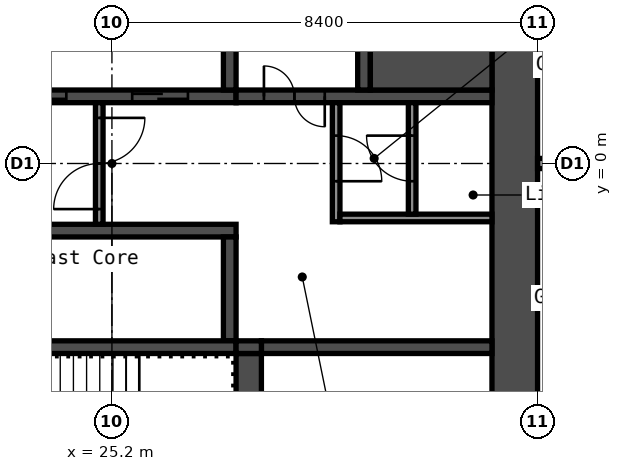
"""IFC4 building model, lengths in metres.
Left out: names, types, materials, properties, quantities, classifications, styles, units other than length and angle.
Written with IfcOpenShell. Run it as: python <this file> out.ifc"""

import sys

from ifc_helpers import new_model, si_unit, direction, frame, frame_2d, origin, place, context, subcontext, project, spatial, rectangle, extrude, element, fill, save


model = new_model("IFC4")
c1 = context("Model", 3, precision=1e-05, world=origin(), true_north=direction((0.0, 1.0)))
c2 = subcontext(c1, "Body", "Model", "MODEL_VIEW")
j1 = project(units=[si_unit("LENGTHUNIT", "METRE"), si_unit("PLANEANGLEUNIT", "RADIAN")], contexts=[c1])
p1 = place(None, origin())
s1 = spatial("IfcSite", under=j1, at=p1, CompositionType="ELEMENT")
p2 = place(p1, origin())
s2 = spatial("IfcBuilding", under=s1, at=p2, CompositionType="ELEMENT")
p3 = place(p2, frame((0.0, 0.0, 32.6)))
s3 = spatial("IfcBuildingStorey", under=s2, at=p3, CompositionType="ELEMENT", Elevation=32.6)
p4 = place(p3, frame((33.15, -8.4, 0.0), z_axis=(0.0, 0.0, 1.0), x_axis=(0.0, 1.0, 0.0)))
e1 = element("IfcWall", 1, at=p4, inside=s3, PredefinedType="SHEAR", context=c2, shape_type="SweptSolid", body=[
    extrude(rectangle(XDim=16.8, YDim=0.9, at=frame_2d((8.4, 0.0))), origin(), (0.0, 0.0, 1.0), 2.8),
])
p5 = place(p3, frame((20.15, 1.325, 0.0), z_axis=(0.0, 0.0, 1.0), x_axis=(1.0, 0.0, 0.0)))
e2 = element("IfcWall", 2, at=p5, inside=s3, PredefinedType="SHEAR", context=c2, shape_type="SweptSolid", body=[
    extrude(rectangle(XDim=7.5, YDim=0.25, at=frame_2d((3.75, 0.0))), origin(), (0.0, 0.0, 1.0), 2.8),
])
p6 = place(p5, frame((0.65, 0.0, 0.0)))
e3 = element("IfcOpeningElement", 3, at=p6, cuts=e2, PredefinedType="OPENING", context=c2, shape_type="SweptSolid", body=[
    extrude(rectangle(XDim=1.1, YDim=2.1, at=frame_2d((0.55, 1.05))), frame((0.0, 0.135, 0.0), z_axis=(0.0, -1.0, 0.0), x_axis=(1.0, 0.0, 0.0)), (0.0, 0.0, 1.0), 0.27),
])
p7 = place(p5, frame((3.05, 0.0, 0.0)))
e4 = element("IfcOpeningElement", 4, at=p7, cuts=e2, PredefinedType="OPENING", context=c2, shape_type="SweptSolid", body=[
    extrude(rectangle(XDim=1.1, YDim=2.1, at=frame_2d((0.55, 1.05))), frame((0.0, 0.135, 0.0), z_axis=(0.0, -1.0, 0.0), x_axis=(1.0, 0.0, 0.0)), (0.0, 0.0, 1.0), 0.27),
])
p8 = place(p5, frame((5.45, 0.0, 0.0)))
e5 = element("IfcOpeningElement", 5, at=p8, cuts=e2, PredefinedType="OPENING", context=c2, shape_type="SweptSolid", body=[
    extrude(rectangle(XDim=1.1, YDim=2.1, at=frame_2d((0.55, 1.05))), frame((0.0, 0.135, 0.0), z_axis=(0.0, -1.0, 0.0), x_axis=(1.0, 0.0, 0.0)), (0.0, 0.0, 1.0), 0.27),
])
p9 = place(p3, frame((27.525, 1.45, 0.0), z_axis=(0.0, 0.0, 1.0), x_axis=(0.0, 1.0, 0.0)))
e6 = element("IfcWall", 6, at=p9, inside=s3, PredefinedType="SHEAR", context=c2, shape_type="SweptSolid", body=[
    extrude(rectangle(XDim=2.05, YDim=0.25, at=frame_2d((1.025, 0.0))), origin(), (0.0, 0.0, 1.0), 2.8),
])
p10 = place(p3, frame((27.65, 1.325, 0.0), z_axis=(0.0, 0.0, 1.0), x_axis=(1.0, 0.0, 0.0)))
e7 = element("IfcWall", 7, at=p10, inside=s3, PredefinedType="SHEAR", context=c2, shape_type="SweptSolid", body=[
    extrude(rectangle(XDim=5.05, YDim=0.25, at=frame_2d((2.525, 0.0))), origin(), (0.0, 0.0, 1.0), 2.8),
])
p11 = place(p10, frame((0.55, 0.0, 0.0)))
e8 = element("IfcOpeningElement", 8, at=p11, cuts=e7, PredefinedType="OPENING", context=c2, shape_type="SweptSolid", body=[
    extrude(rectangle(XDim=1.2, YDim=2.1, at=frame_2d((0.6, 1.05))), frame((0.0, 0.135, 0.0), z_axis=(0.0, -1.0, 0.0), x_axis=(1.0, 0.0, 0.0)), (0.0, 0.0, 1.0), 0.27),
])
p12 = place(p3, frame((30.175, 1.45, 0.0), z_axis=(0.0, 0.0, 1.0), x_axis=(0.0, 1.0, 0.0)))
e9 = element("IfcWall", 9, at=p12, inside=s3, PredefinedType="SHEAR", context=c2, shape_type="SweptSolid", body=[
    extrude(rectangle(XDim=6.05, YDim=0.25, at=frame_2d((3.025, 0.0))), origin(), (0.0, 0.0, 1.0), 2.8),
])
p13 = place(p12, frame((2.625, 0.0, 0.0)))
e10 = element("IfcOpeningElement", 10, at=p13, cuts=e9, PredefinedType="OPENING", context=c2, shape_type="SweptSolid", body=[
    extrude(rectangle(XDim=1.1, YDim=2.1, at=frame_2d((0.55, 1.05))), frame((0.0, 0.135, 0.0), z_axis=(0.0, -1.0, 0.0), x_axis=(1.0, 0.0, 0.0)), (0.0, 0.0, 1.0), 0.27),
])
p14 = place(p3, frame((30.3, 2.375, 0.0), z_axis=(0.0, 0.0, 1.0), x_axis=(1.0, 0.0, 0.0)))
e11 = element("IfcWall", 11, at=p14, inside=s3, PredefinedType="SHEAR", context=c2, shape_type="SweptSolid", body=[
    extrude(rectangle(XDim=2.4, YDim=1.85, at=frame_2d((1.2, 0.0))), origin(), (0.0, 0.0, 1.0), 2.8),
])
p15 = place(p3, frame((20.15, -1.325, 0.0), z_axis=(0.0, 0.0, 1.0), x_axis=(1.0, 0.0, 0.0)))
e12 = element("IfcWall", 12, at=p15, inside=s3, PredefinedType="SHEAR", context=c2, shape_type="SweptSolid", body=[
    extrude(rectangle(XDim=7.5, YDim=0.25, at=frame_2d((3.75, 0.0))), origin(), (0.0, 0.0, 1.0), 2.8),
])
p16 = place(p3, frame((27.525, -3.5, 0.0), z_axis=(0.0, 0.0, 1.0), x_axis=(0.0, 1.0, 0.0)))
e13 = element("IfcWall", 13, at=p16, inside=s3, PredefinedType="SHEAR", context=c2, shape_type="SweptSolid", body=[
    extrude(rectangle(XDim=2.05, YDim=0.25, at=frame_2d((1.025, 0.0))), origin(), (0.0, 0.0, 1.0), 2.8),
])
p17 = place(p3, frame((20.15, -3.625, 0.0), z_axis=(0.0, 0.0, 1.0), x_axis=(1.0, 0.0, 0.0)))
e14 = element("IfcWall", 14, at=p17, inside=s3, PredefinedType="SHEAR", context=c2, shape_type="SweptSolid", body=[
    extrude(rectangle(XDim=7.5, YDim=0.25, at=frame_2d((3.75, 0.0))), origin(), (0.0, 0.0, 1.0), 2.8),
])
p18 = place(p3, frame((27.9, -7.5, 0.0), z_axis=(0.0, 0.0, 1.0), x_axis=(0.0, 1.0, 0.0)))
e15 = element("IfcWall", 15, at=p18, inside=s3, PredefinedType="SHEAR", context=c2, shape_type="SweptSolid", body=[
    extrude(rectangle(XDim=3.75, YDim=0.5, at=frame_2d((1.875, 0.0))), origin(), (0.0, 0.0, 1.0), 2.8),
])
p19 = place(p3, frame((28.15, -3.625, 0.0), z_axis=(0.0, 0.0, 1.0), x_axis=(1.0, 0.0, 0.0)))
e16 = element("IfcWall", 16, at=p19, inside=s3, PredefinedType="SHEAR", context=c2, shape_type="SweptSolid", body=[
    extrude(rectangle(XDim=4.55, YDim=0.25, at=frame_2d((2.275, 0.0))), origin(), (0.0, 0.0, 1.0), 2.8),
])
p20 = place(p3, frame((27.65, -3.625, 0.0), z_axis=(0.0, 0.0, 1.0), x_axis=(1.0, 0.0, 0.0)))
e17 = element("IfcWall", 17, at=p20, inside=s3, PredefinedType="SHEAR", context=c2, shape_type="SweptSolid", body=[
    extrude(rectangle(XDim=0.5, YDim=0.25, at=frame_2d((0.25, 0.0))), origin(), (0.0, 0.0, 1.0), 2.8),
])
p21 = place(p3, frame((24.95, -1.2, 0.0), z_axis=(0.0, 0.0, 1.0), x_axis=(0.0, 1.0, 0.0)))
e18 = element("IfcWall", 18, at=p21, inside=s3, PredefinedType="PARTITIONING", context=c2, shape_type="SweptSolid", body=[
    extrude(rectangle(XDim=2.4, YDim=0.15, at=frame_2d((1.2, 0.0))), origin(), (0.0, 0.0, 1.0), 2.8),
])
p22 = place(p21, frame((0.3, 0.0, 0.0)))
e19 = element("IfcOpeningElement", 19, at=p22, cuts=e18, PredefinedType="OPENING", context=c2, shape_type="SweptSolid", body=[
    extrude(rectangle(XDim=1.8, YDim=2.1, at=frame_2d((0.9, 1.05))), frame((0.0, 0.085, 0.0), z_axis=(0.0, -1.0, 0.0), x_axis=(1.0, 0.0, 0.0)), (0.0, 0.0, 1.0), 0.17),
])
p23 = place(p3, frame((29.625, -1.15, 0.0), z_axis=(0.0, 0.0, 1.0), x_axis=(0.0, 1.0, 0.0)))
e20 = element("IfcWall", 20, at=p23, inside=s3, PredefinedType="PARTITIONING", context=c2, shape_type="SweptSolid", body=[
    extrude(rectangle(XDim=2.35, YDim=0.15, at=frame_2d((1.175, 0.0))), origin(), (0.0, 0.0, 1.0), 2.8),
])
p24 = place(p23, frame((0.8, 0.0, 0.0)))
e21 = element("IfcOpeningElement", 21, at=p24, cuts=e20, PredefinedType="OPENING", context=c2, shape_type="SweptSolid", body=[
    extrude(rectangle(XDim=0.9, YDim=2.1, at=frame_2d((0.45, 1.05))), frame((0.0, 0.085, 0.0), z_axis=(0.0, -1.0, 0.0), x_axis=(1.0, 0.0, 0.0)), (0.0, 0.0, 1.0), 0.17),
])
p25 = place(p3, frame((29.7, -1.075, 0.0), z_axis=(0.0, 0.0, 1.0), x_axis=(1.0, 0.0, 0.0)))
e22 = element("IfcWall", 22, at=p25, inside=s3, PredefinedType="PARTITIONING", context=c2, shape_type="SweptSolid", body=[
    extrude(rectangle(XDim=3.0, YDim=0.15, at=frame_2d((1.5, 0.0))), origin(), (0.0, 0.0, 1.0), 2.8),
])
p26 = place(p3, frame((31.125, -1.0, 0.0), z_axis=(0.0, 0.0, 1.0), x_axis=(0.0, 1.0, 0.0)))
e23 = element("IfcWall", 23, at=p26, inside=s3, PredefinedType="PARTITIONING", context=c2, shape_type="SweptSolid", body=[
    extrude(rectangle(XDim=2.2, YDim=0.15, at=frame_2d((1.1, 0.0))), origin(), (0.0, 0.0, 1.0), 2.8),
])
p27 = place(p26, frame((0.65, 0.0, 0.0)))
e24 = element("IfcOpeningElement", 24, at=p27, cuts=e23, PredefinedType="OPENING", context=c2, shape_type="SweptSolid", body=[
    extrude(rectangle(XDim=0.9, YDim=2.1, at=frame_2d((0.45, 1.05))), frame((0.0, 0.085, 0.0), z_axis=(0.0, -1.0, 0.0), x_axis=(1.0, 0.0, 0.0)), (0.0, 0.0, 1.0), 0.17),
])
p28 = place(p3, frame((33.6, 0.0, 0.0), z_axis=(0.0, 0.0, 1.0), x_axis=(1.0, 0.0, 0.0)))
e25 = element("IfcWall", 25, at=p28, inside=s3, PredefinedType="PARTITIONING", context=c2, shape_type="SweptSolid", body=[
    extrude(rectangle(XDim=14.9, YDim=0.2, at=frame_2d((7.45, 0.0))), origin(), (0.0, 0.0, 1.0), 2.8),
])
p29 = place(p11, origin())
e26 = element("IfcDoor", 26, at=p29, inside=s3, OperationType="DOUBLE_DOOR_SINGLE_SWING", PredefinedType="DOOR", context=c2, shape_type="SweptSolid", body=[
    extrude(rectangle(XDim=1.2, YDim=2.1, at=frame_2d((0.6, 1.05))), frame((0.0, 0.025, 0.0), z_axis=(0.0, -1.0, 0.0), x_axis=(1.0, 0.0, 0.0)), (0.0, 0.0, 1.0), 0.05),
])
fill(e8, e26)
p30 = place(p22, origin())
e27 = element("IfcDoor", 27, at=p30, inside=s3, OperationType="DOUBLE_DOOR_SINGLE_SWING", PredefinedType="DOOR", context=c2, shape_type="SweptSolid", body=[
    extrude(rectangle(XDim=1.8, YDim=2.1, at=frame_2d((0.9, 1.05))), frame((0.0, 0.025, 0.0), z_axis=(0.0, -1.0, 0.0), x_axis=(1.0, 0.0, 0.0)), (0.0, 0.0, 1.0), 0.05),
])
fill(e19, e27)
p31 = place(p24, origin())
e28 = element("IfcDoor", 28, at=p31, inside=s3, OperationType="SINGLE_SWING_LEFT", PredefinedType="DOOR", context=c2, shape_type="SweptSolid", body=[
    extrude(rectangle(XDim=0.9, YDim=2.1, at=frame_2d((0.45, 1.05))), frame((0.0, 0.025, 0.0), z_axis=(0.0, -1.0, 0.0), x_axis=(1.0, 0.0, 0.0)), (0.0, 0.0, 1.0), 0.05),
])
fill(e21, e28)
p32 = place(p27, origin())
e29 = element("IfcDoor", 29, at=p32, inside=s3, OperationType="SINGLE_SWING_LEFT", PredefinedType="DOOR", context=c2, shape_type="SweptSolid", body=[
    extrude(rectangle(XDim=0.9, YDim=2.1, at=frame_2d((0.45, 1.05))), frame((0.0, 0.025, 0.0), z_axis=(0.0, -1.0, 0.0), x_axis=(1.0, 0.0, 0.0)), (0.0, 0.0, 1.0), 0.05),
])
fill(e24, e29)
p33 = place(p7, origin())
e30 = element("IfcDoor", 30, at=p33, inside=s3, OperationType="DOUBLE_DOOR_SLIDING", PredefinedType="DOOR", context=c2, shape_type="SweptSolid", body=[
    extrude(rectangle(XDim=1.1, YDim=2.1, at=frame_2d((0.55, 1.05))), frame((0.0, 0.025, 0.0), z_axis=(0.0, -1.0, 0.0), x_axis=(1.0, 0.0, 0.0)), (0.0, 0.0, 1.0), 0.05),
])
fill(e4, e30)
p34 = place(p8, origin())
e31 = element("IfcDoor", 31, at=p34, inside=s3, OperationType="DOUBLE_DOOR_SLIDING", PredefinedType="DOOR", context=c2, shape_type="SweptSolid", body=[
    extrude(rectangle(XDim=1.1, YDim=2.1, at=frame_2d((0.55, 1.05))), frame((0.0, 0.025, 0.0), z_axis=(0.0, -1.0, 0.0), x_axis=(1.0, 0.0, 0.0)), (0.0, 0.0, 1.0), 0.05),
])
fill(e5, e31)
save(model, sys.argv[1])
